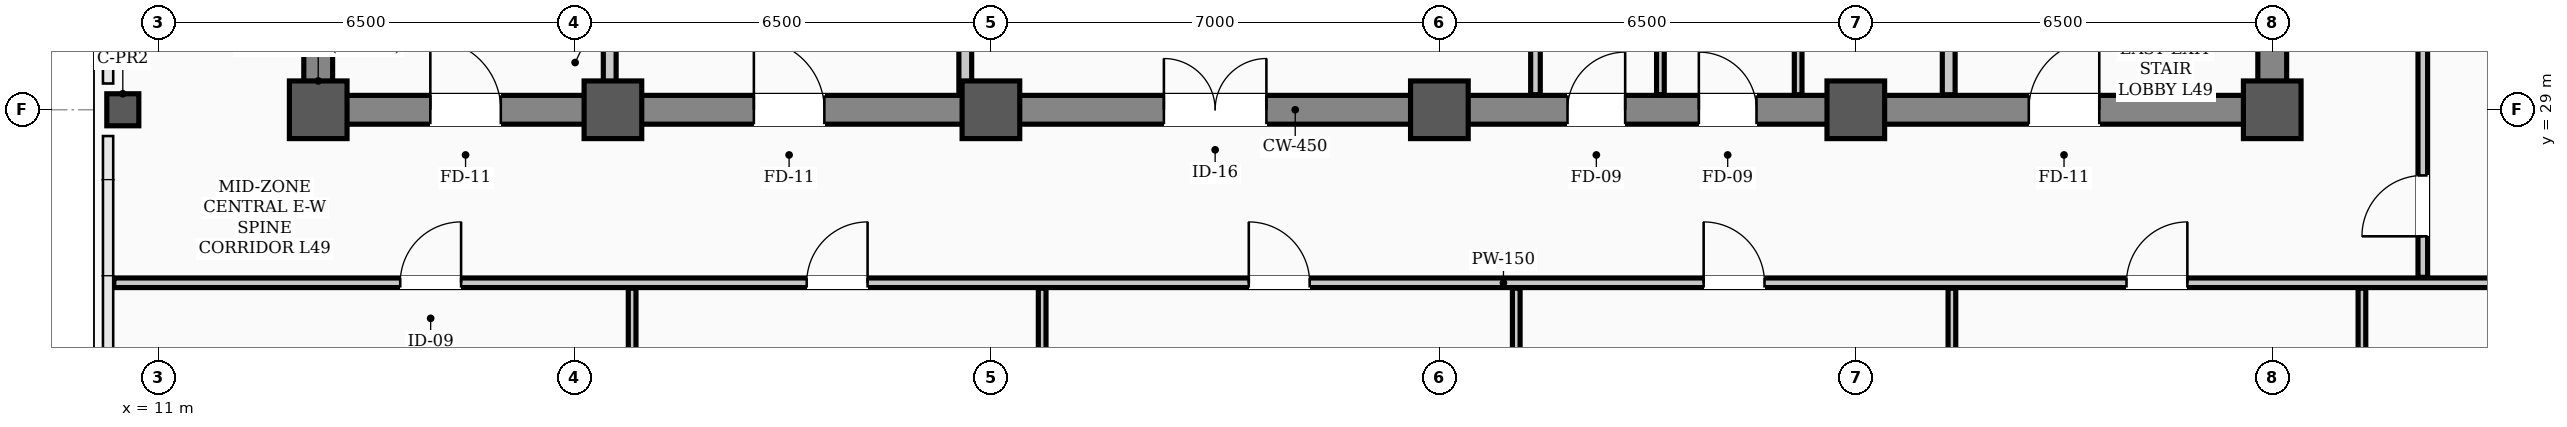
"""IFC4 building model, lengths in metres.
Left out: names, types, materials, properties, quantities, classifications, styles, units other than length and angle.
Written with IfcOpenShell. Run it as: python <this file> out.ifc"""

import sys

from ifc_helpers import new_model, si_unit, direction, frame, frame_2d, origin, origin_2d, place, context, subcontext, project, spatial, rectangle, hollow_rectangle, extrude, element, fill, save


model = new_model("IFC4")
c1 = context("Model", 3, precision=1e-05, world=origin(), true_north=direction((0.0, 1.0)))
c2 = subcontext(c1, "Body", "Model", "MODEL_VIEW")
j1 = project(units=[si_unit("LENGTHUNIT", "METRE"), si_unit("PLANEANGLEUNIT", "RADIAN")], contexts=[c1])
p1 = place(None, origin())
s1 = spatial("IfcSite", under=j1, at=p1, CompositionType="ELEMENT")
p2 = place(p1, origin())
s2 = spatial("IfcBuilding", under=s1, at=p2, CompositionType="ELEMENT")
p3 = place(p2, frame((0.0, 0.0, 196.8)))
s3 = spatial("IfcBuildingStorey", under=s2, at=p3, CompositionType="ELEMENT", Elevation=196.8)
for number, where, z_axis, x_axis in (
    (1, (13.5, 29.0, 0.0), (0.0, 0.0, 1.0), (1.0, 0.0, 0.0)),
    (2, (18.1, 29.0, 0.0), (0.0, 0.0, 1.0), (1.0, 0.0, 0.0)),
    (3, (24.0, 29.0, 0.0), (0.0, 0.0, 1.0), (1.0, 0.0, 0.0)),
    (4, (31.0, 29.0, 0.0), (0.0, 0.0, 1.0), (1.0, 0.0, 0.0)),
    (5, (37.5, 29.0, 0.0), (0.0, 0.0, 1.0), (1.0, 0.0, 0.0)),
    (6, (44.0, 29.0, 0.0), (0.0, 0.0, 1.0), (1.0, 0.0, 0.0)),
):
    element("IfcColumn", number, at=place(p3, frame(where, z_axis=z_axis, x_axis=x_axis)), inside=s3, PredefinedType="COLUMN", context=c2, shape_type="SweptSolid", body=[
        extrude(hollow_rectangle(XDim=0.9, YDim=0.9, WallThickness=0.035, InnerFilletRadius=0.017, OuterFilletRadius=0.052, at=origin_2d()), origin(), (0.0, 0.0, 1.0), 3.9),
    ])
p4 = place(p3, frame((10.45, 29.0, 0.0), z_axis=(0.0, 0.0, 1.0), x_axis=(1.0, 0.0, 0.0)))
e7 = element("IfcColumn", 7, at=p4, inside=s3, PredefinedType="COLUMN", context=c2, shape_type="SweptSolid", body=[
    extrude(hollow_rectangle(XDim=0.5, YDim=0.5, WallThickness=0.024, InnerFilletRadius=0.012, OuterFilletRadius=0.036, at=origin_2d()), origin(), (0.0, 0.0, 1.0), 3.9),
])
p5 = place(p3, frame((13.5, 29.0, 0.0), z_axis=(0.0, 0.0, 1.0), x_axis=(1.0, 0.0, 0.0)))
e8 = element("IfcWall", 8, at=p5, inside=s3, PredefinedType="SHEAR", context=c2, shape_type="SweptSolid", body=[
    extrude(rectangle(XDim=30.5, YDim=0.45, at=frame_2d((15.25, 0.0))), origin(), (0.0, 0.0, 1.0), 3.6),
])
p6 = place(p5, frame((1.75, 0.0, 0.0)))
e9 = element("IfcOpeningElement", 9, at=p6, cuts=e8, PredefinedType="OPENING", context=c2, shape_type="SweptSolid", body=[
    extrude(rectangle(XDim=1.1, YDim=2.08, at=frame_2d((0.55, 1.04))), frame((0.0, 0.235, 0.0), z_axis=(0.0, -1.0, 0.0), x_axis=(1.0, 0.0, 0.0)), (0.0, 0.0, 1.0), 0.47),
])
p7 = place(p5, frame((26.7, 0.0, 0.0)))
e10 = element("IfcOpeningElement", 10, at=p7, cuts=e8, PredefinedType="OPENING", context=c2, shape_type="SweptSolid", body=[
    extrude(rectangle(XDim=1.1, YDim=2.08, at=frame_2d((0.55, 1.04))), frame((0.0, 0.235, 0.0), z_axis=(0.0, -1.0, 0.0), x_axis=(1.0, 0.0, 0.0)), (0.0, 0.0, 1.0), 0.47),
])
p8 = place(p5, frame((6.8, 0.0, 0.0)))
e11 = element("IfcOpeningElement", 11, at=p8, cuts=e8, PredefinedType="OPENING", context=c2, shape_type="SweptSolid", body=[
    extrude(rectangle(XDim=1.1, YDim=2.08, at=frame_2d((0.55, 1.04))), frame((0.0, 0.235, 0.0), z_axis=(0.0, -1.0, 0.0), x_axis=(1.0, 0.0, 0.0)), (0.0, 0.0, 1.0), 0.47),
])
p9 = place(p5, frame((13.2, 0.0, 0.0)))
e12 = element("IfcOpeningElement", 12, at=p9, cuts=e8, PredefinedType="OPENING", context=c2, shape_type="SweptSolid", body=[
    extrude(rectangle(XDim=1.6, YDim=2.08, at=frame_2d((0.8, 1.04))), frame((0.0, 0.235, 0.0), z_axis=(0.0, -1.0, 0.0), x_axis=(1.0, 0.0, 0.0)), (0.0, 0.0, 1.0), 0.47),
])
p10 = place(p5, frame((19.5, 0.0, 0.0)))
e13 = element("IfcOpeningElement", 13, at=p10, cuts=e8, PredefinedType="OPENING", context=c2, shape_type="SweptSolid", body=[
    extrude(rectangle(XDim=0.9, YDim=2.08, at=frame_2d((0.45, 1.04))), frame((0.0, 0.235, 0.0), z_axis=(0.0, -1.0, 0.0), x_axis=(1.0, 0.0, 0.0)), (0.0, 0.0, 1.0), 0.47),
])
p11 = place(p5, frame((21.55, 0.0, 0.0)))
e14 = element("IfcOpeningElement", 14, at=p11, cuts=e8, PredefinedType="OPENING", context=c2, shape_type="SweptSolid", body=[
    extrude(rectangle(XDim=0.9, YDim=2.08, at=frame_2d((0.45, 1.04))), frame((0.0, 0.235, 0.0), z_axis=(0.0, -1.0, 0.0), x_axis=(1.0, 0.0, 0.0)), (0.0, 0.0, 1.0), 0.47),
])
for number, where, z_axis, x_axis in (
    (15, (13.5, 29.35, 0.0), (0.0, 0.0, 1.0), (0.0, 1.0, 0.0)),
    (16, (44.0, 29.35, 0.0), (0.0, 0.0, 1.0), (0.0, 1.0, 0.0)),
):
    element("IfcWall", number, at=place(p3, frame(where, z_axis=z_axis, x_axis=x_axis)), inside=s3, PredefinedType="SHEAR", context=c2, shape_type="SweptSolid", body=[
        extrude(rectangle(XDim=8.6, YDim=0.45, at=frame_2d((4.3, 0.0))), origin(), (0.0, 0.0, 1.0), 3.6),
    ])
p12 = place(p3, frame((10.31, 26.3, 0.0), z_axis=(0.0, 0.0, 1.0), x_axis=(1.0, 0.0, 0.0)))
e17 = element("IfcWall", 17, at=p12, inside=s3, PredefinedType="PARTITIONING", context=c2, shape_type="SweptSolid", body=[
    extrude(rectangle(XDim=43.38, YDim=0.15, at=frame_2d((21.69, 0.0))), origin(), (0.0, 0.0, 1.0), 2.18),
])
p13 = place(p12, frame((4.47, 0.0, 0.0)))
e18 = element("IfcOpeningElement", 18, at=p13, cuts=e17, PredefinedType="OPENING", context=c2, shape_type="SweptSolid", body=[
    extrude(rectangle(XDim=0.95, YDim=2.08, at=frame_2d((0.475, 1.04))), frame((0.0, 0.085, 0.0), z_axis=(0.0, -1.0, 0.0), x_axis=(1.0, 0.0, 0.0)), (0.0, 0.0, 1.0), 0.17),
])
p14 = place(p12, frame((10.815, 0.0, 0.0)))
e19 = element("IfcOpeningElement", 19, at=p14, cuts=e17, PredefinedType="OPENING", context=c2, shape_type="SweptSolid", body=[
    extrude(rectangle(XDim=0.95, YDim=2.08, at=frame_2d((0.475, 1.04))), frame((0.0, 0.085, 0.0), z_axis=(0.0, -1.0, 0.0), x_axis=(1.0, 0.0, 0.0)), (0.0, 0.0, 1.0), 0.17),
])
p15 = place(p12, frame((17.715, 0.0, 0.0)))
e20 = element("IfcOpeningElement", 20, at=p15, cuts=e17, PredefinedType="OPENING", context=c2, shape_type="SweptSolid", body=[
    extrude(rectangle(XDim=0.95, YDim=2.08, at=frame_2d((0.475, 1.04))), frame((0.0, 0.085, 0.0), z_axis=(0.0, -1.0, 0.0), x_axis=(1.0, 0.0, 0.0)), (0.0, 0.0, 1.0), 0.17),
])
p16 = place(p12, frame((24.815, 0.0, 0.0)))
e21 = element("IfcOpeningElement", 21, at=p16, cuts=e17, PredefinedType="OPENING", context=c2, shape_type="SweptSolid", body=[
    extrude(rectangle(XDim=0.95, YDim=2.08, at=frame_2d((0.475, 1.04))), frame((0.0, 0.085, 0.0), z_axis=(0.0, -1.0, 0.0), x_axis=(1.0, 0.0, 0.0)), (0.0, 0.0, 1.0), 0.17),
])
p17 = place(p12, frame((31.415, 0.0, 0.0)))
e22 = element("IfcOpeningElement", 22, at=p17, cuts=e17, PredefinedType="OPENING", context=c2, shape_type="SweptSolid", body=[
    extrude(rectangle(XDim=0.95, YDim=2.08, at=frame_2d((0.475, 1.04))), frame((0.0, 0.085, 0.0), z_axis=(0.0, -1.0, 0.0), x_axis=(1.0, 0.0, 0.0)), (0.0, 0.0, 1.0), 0.17),
])
for number, where, z_axis, x_axis in (
    (23, (18.05, 29.235, 0.0), (0.0, 0.0, 1.0), (0.0, 1.0, 0.0)),
    (24, (38.95, 29.235, 0.0), (0.0, 0.0, 1.0), (0.0, 1.0, 0.0)),
):
    element("IfcWall", number, at=place(p3, frame(where, z_axis=z_axis, x_axis=x_axis)), inside=s3, PredefinedType="STANDARD", context=c2, shape_type="SweptSolid", body=[
        extrude(rectangle(XDim=1.065, YDim=0.2, at=frame_2d((0.532, 0.0))), origin(), (0.0, 0.0, 1.0), 2.18),
    ])
p18 = place(p3, frame((23.6, 29.235, 0.0), z_axis=(0.0, 0.0, 1.0), x_axis=(0.0, 1.0, 0.0)))
e25 = element("IfcWall", 25, at=p18, inside=s3, PredefinedType="STANDARD", context=c2, shape_type="SweptSolid", body=[
    extrude(rectangle(XDim=5.465, YDim=0.2, at=frame_2d((2.732, 0.0))), origin(), (0.0, 0.0, 1.0), 2.18),
])
p19 = place(p3, frame((32.5, 29.235, 0.0), z_axis=(0.0, 0.0, 1.0), x_axis=(0.0, 1.0, 0.0)))
e26 = element("IfcWall", 26, at=p19, inside=s3, PredefinedType="PARTITIONING", context=c2, shape_type="SweptSolid", body=[
    extrude(rectangle(XDim=2.53, YDim=0.15, at=frame_2d((1.265, 0.0))), origin(), (0.0, 0.0, 1.0), 2.18),
])
for number, where, z_axis, x_axis in (
    (27, (36.6, 29.235, 0.0), (0.0, 0.0, 1.0), (0.0, 1.0, 0.0)),
    (28, (34.45, 29.235, 0.0), (0.0, 0.0, 1.0), (0.0, 1.0, 0.0)),
):
    element("IfcWall", number, at=place(p3, frame(where, z_axis=z_axis, x_axis=x_axis)), inside=s3, PredefinedType="PARTITIONING", context=c2, shape_type="SweptSolid", body=[
        extrude(rectangle(XDim=2.53, YDim=0.12, at=frame_2d((1.265, 0.0))), origin(), (0.0, 0.0, 1.0), 2.18),
    ])
p20 = place(p3, frame((46.35, 26.385, 0.0), z_axis=(0.0, 0.0, 1.0), x_axis=(0.0, 1.0, 0.0)))
e29 = element("IfcWall", 29, at=p20, inside=s3, PredefinedType="PARTITIONING", context=c2, shape_type="SweptSolid", body=[
    extrude(rectangle(XDim=10.53, YDim=0.15, at=frame_2d((5.265, 0.0))), origin(), (0.0, 0.0, 1.0), 2.18),
])
p21 = place(p20, frame((0.64, 0.0, 0.0)))
e30 = element("IfcOpeningElement", 30, at=p21, cuts=e29, PredefinedType="OPENING", context=c2, shape_type="SweptSolid", body=[
    extrude(rectangle(XDim=0.95, YDim=2.08, at=frame_2d((0.475, 1.04))), frame((0.0, 0.085, 0.0), z_axis=(0.0, -1.0, 0.0), x_axis=(1.0, 0.0, 0.0)), (0.0, 0.0, 1.0), 0.17),
])
p22 = place(p20, frame((7.64, 0.0, 0.0)))
e31 = element("IfcOpeningElement", 31, at=p22, cuts=e29, PredefinedType="OPENING", context=c2, shape_type="SweptSolid", body=[
    extrude(rectangle(XDim=0.95, YDim=2.08, at=frame_2d((0.475, 1.04))), frame((0.0, 0.085, 0.0), z_axis=(0.0, -1.0, 0.0), x_axis=(1.0, 0.0, 0.0)), (0.0, 0.0, 1.0), 0.17),
])
p23 = place(p3, frame((18.4, 11.56, 0.0), z_axis=(0.0, 0.0, 1.0), x_axis=(0.0, 1.0, 0.0)))
e32 = element("IfcWall", 32, at=p23, inside=s3, PredefinedType="PARTITIONING", context=c2, shape_type="SweptSolid", body=[
    extrude(rectangle(XDim=14.655, YDim=0.12, at=frame_2d((7.328, 0.0))), origin(), (0.0, 0.0, 1.0), 2.18),
])
p24 = place(p3, frame((24.8, 13.32, 0.0), z_axis=(0.0, 0.0, 1.0), x_axis=(0.0, 1.0, 0.0)))
e33 = element("IfcWall", 33, at=p24, inside=s3, PredefinedType="PARTITIONING", context=c2, shape_type="SweptSolid", body=[
    extrude(rectangle(XDim=12.895, YDim=0.12, at=frame_2d((6.448, 0.0))), origin(), (0.0, 0.0, 1.0), 2.18),
])
for number, where, z_axis, x_axis in (
    (34, (32.2, 11.56, 0.0), (0.0, 0.0, 1.0), (0.0, 1.0, 0.0)),
    (35, (39.0, 11.56, 0.0), (0.0, 0.0, 1.0), (0.0, 1.0, 0.0)),
):
    element("IfcWall", number, at=place(p3, frame(where, z_axis=z_axis, x_axis=x_axis)), inside=s3, PredefinedType="PARTITIONING", context=c2, shape_type="SweptSolid", body=[
        extrude(rectangle(XDim=14.655, YDim=0.12, at=frame_2d((7.328, 0.0))), origin(), (0.0, 0.0, 1.0), 2.18),
    ])
p25 = place(p3, frame((45.4, 11.56, 0.0), z_axis=(0.0, 0.0, 1.0), x_axis=(0.0, 1.0, 0.0)))
e36 = element("IfcWall", 36, at=p25, inside=s3, PredefinedType="PARTITIONING", context=c2, shape_type="SweptSolid", body=[
    extrude(rectangle(XDim=14.655, YDim=0.12, at=frame_2d((7.328, 0.0))), origin(), (0.0, 0.0, 1.0), 2.18),
])
p26 = place(p25, frame((12.665, 0.0, 0.0)))
e37 = element("IfcOpeningElement", 37, at=p26, cuts=e36, PredefinedType="OPENING", context=c2, shape_type="SweptSolid", body=[
    extrude(rectangle(XDim=0.95, YDim=2.08, at=frame_2d((0.475, 1.04))), frame((0.0, 0.07, 0.0), z_axis=(0.0, -1.0, 0.0), x_axis=(1.0, 0.0, 0.0)), (0.0, 0.0, 1.0), 0.14),
])
p27 = place(p6, origin())
e38 = element("IfcDoor", 38, at=p27, inside=s3, OperationType="SINGLE_SWING_LEFT", PredefinedType="DOOR", context=c2, shape_type="SweptSolid", body=[
    extrude(rectangle(XDim=1.1, YDim=2.08, at=frame_2d((0.55, 1.04))), frame((0.0, 0.025, 0.0), z_axis=(0.0, -1.0, 0.0), x_axis=(1.0, 0.0, 0.0)), (0.0, 0.0, 1.0), 0.05),
])
fill(e9, e38)
p28 = place(p7, origin())
e39 = element("IfcDoor", 39, at=p28, inside=s3, OperationType="SINGLE_SWING_RIGHT", PredefinedType="DOOR", context=c2, shape_type="SweptSolid", body=[
    extrude(rectangle(XDim=1.1, YDim=2.08, at=frame_2d((0.55, 1.04))), frame((0.0, 0.025, 0.0), z_axis=(0.0, -1.0, 0.0), x_axis=(1.0, 0.0, 0.0)), (0.0, 0.0, 1.0), 0.05),
])
fill(e10, e39)
p29 = place(p8, origin())
e40 = element("IfcDoor", 40, at=p29, inside=s3, OperationType="SINGLE_SWING_LEFT", PredefinedType="DOOR", context=c2, shape_type="SweptSolid", body=[
    extrude(rectangle(XDim=1.1, YDim=2.08, at=frame_2d((0.55, 1.04))), frame((0.0, 0.025, 0.0), z_axis=(0.0, -1.0, 0.0), x_axis=(1.0, 0.0, 0.0)), (0.0, 0.0, 1.0), 0.05),
])
fill(e11, e40)
p30 = place(p9, origin())
e41 = element("IfcDoor", 41, at=p30, inside=s3, OperationType="DOUBLE_DOOR_SINGLE_SWING", PredefinedType="DOOR", context=c2, shape_type="SweptSolid", body=[
    extrude(rectangle(XDim=1.6, YDim=2.08, at=frame_2d((0.8, 1.04))), frame((0.0, 0.025, 0.0), z_axis=(0.0, -1.0, 0.0), x_axis=(1.0, 0.0, 0.0)), (0.0, 0.0, 1.0), 0.05),
])
fill(e12, e41)
p31 = place(p10, origin())
e42 = element("IfcDoor", 42, at=p31, inside=s3, OperationType="SINGLE_SWING_RIGHT", PredefinedType="DOOR", context=c2, shape_type="SweptSolid", body=[
    extrude(rectangle(XDim=0.9, YDim=2.08, at=frame_2d((0.45, 1.04))), frame((0.0, 0.025, 0.0), z_axis=(0.0, -1.0, 0.0), x_axis=(1.0, 0.0, 0.0)), (0.0, 0.0, 1.0), 0.05),
])
fill(e13, e42)
p32 = place(p11, origin())
e43 = element("IfcDoor", 43, at=p32, inside=s3, OperationType="SINGLE_SWING_LEFT", PredefinedType="DOOR", context=c2, shape_type="SweptSolid", body=[
    extrude(rectangle(XDim=0.9, YDim=2.08, at=frame_2d((0.45, 1.04))), frame((0.0, 0.025, 0.0), z_axis=(0.0, -1.0, 0.0), x_axis=(1.0, 0.0, 0.0)), (0.0, 0.0, 1.0), 0.05),
])
fill(e14, e43)
p33 = place(p13, origin())
e44 = element("IfcDoor", 44, at=p33, inside=s3, OperationType="SINGLE_SWING_RIGHT", PredefinedType="DOOR", context=c2, shape_type="SweptSolid", body=[
    extrude(rectangle(XDim=0.95, YDim=2.08, at=frame_2d((0.475, 1.04))), frame((0.0, 0.025, 0.0), z_axis=(0.0, -1.0, 0.0), x_axis=(1.0, 0.0, 0.0)), (0.0, 0.0, 1.0), 0.05),
])
fill(e18, e44)
p34 = place(p14, origin())
e45 = element("IfcDoor", 45, at=p34, inside=s3, OperationType="SINGLE_SWING_RIGHT", PredefinedType="DOOR", context=c2, shape_type="SweptSolid", body=[
    extrude(rectangle(XDim=0.95, YDim=2.08, at=frame_2d((0.475, 1.04))), frame((0.0, 0.025, 0.0), z_axis=(0.0, -1.0, 0.0), x_axis=(1.0, 0.0, 0.0)), (0.0, 0.0, 1.0), 0.05),
])
fill(e19, e45)
p35 = place(p15, origin())
e46 = element("IfcDoor", 46, at=p35, inside=s3, OperationType="SINGLE_SWING_LEFT", PredefinedType="DOOR", context=c2, shape_type="SweptSolid", body=[
    extrude(rectangle(XDim=0.95, YDim=2.08, at=frame_2d((0.475, 1.04))), frame((0.0, 0.025, 0.0), z_axis=(0.0, -1.0, 0.0), x_axis=(1.0, 0.0, 0.0)), (0.0, 0.0, 1.0), 0.05),
])
fill(e20, e46)
p36 = place(p16, origin())
e47 = element("IfcDoor", 47, at=p36, inside=s3, OperationType="SINGLE_SWING_LEFT", PredefinedType="DOOR", context=c2, shape_type="SweptSolid", body=[
    extrude(rectangle(XDim=0.95, YDim=2.08, at=frame_2d((0.475, 1.04))), frame((0.0, 0.025, 0.0), z_axis=(0.0, -1.0, 0.0), x_axis=(1.0, 0.0, 0.0)), (0.0, 0.0, 1.0), 0.05),
])
fill(e21, e47)
p37 = place(p17, origin())
e48 = element("IfcDoor", 48, at=p37, inside=s3, OperationType="SINGLE_SWING_RIGHT", PredefinedType="DOOR", context=c2, shape_type="SweptSolid", body=[
    extrude(rectangle(XDim=0.95, YDim=2.08, at=frame_2d((0.475, 1.04))), frame((0.0, 0.025, 0.0), z_axis=(0.0, -1.0, 0.0), x_axis=(1.0, 0.0, 0.0)), (0.0, 0.0, 1.0), 0.05),
])
fill(e22, e48)
p38 = place(p21, origin())
e49 = element("IfcDoor", 49, at=p38, inside=s3, OperationType="SINGLE_SWING_LEFT", PredefinedType="DOOR", context=c2, shape_type="SweptSolid", body=[
    extrude(rectangle(XDim=0.95, YDim=2.08, at=frame_2d((0.475, 1.04))), frame((0.0, 0.025, 0.0), z_axis=(0.0, -1.0, 0.0), x_axis=(1.0, 0.0, 0.0)), (0.0, 0.0, 1.0), 0.05),
])
fill(e30, e49)
save(model, sys.argv[1])
